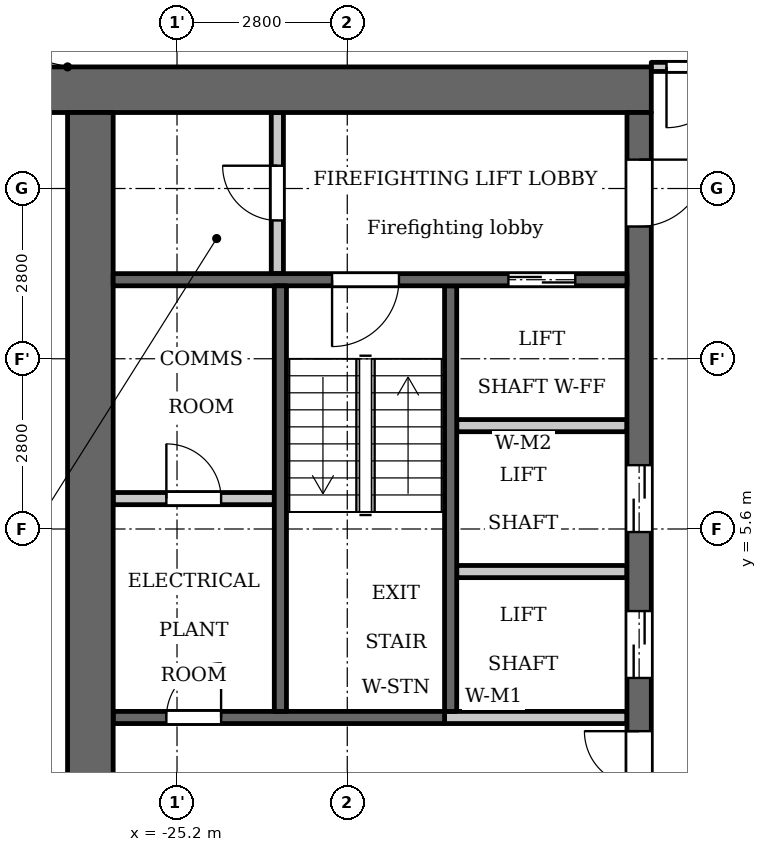
"""IFC4 building model, lengths in metres.
Left out: names, types, materials, properties, quantities, classifications, styles, units other than length and angle.
Written with IfcOpenShell. Run it as: python <this file> out.ifc"""

import sys

from ifc_helpers import new_model, si_unit, direction, frame, frame_2d, origin, place, context, subcontext, project, spatial, rectangle, extrude, element, fill, save


model = new_model("IFC4")
c1 = context("Model", 3, precision=1e-05, world=origin(), true_north=direction((0.0, 1.0)))
c2 = subcontext(c1, "Body", "Model", "MODEL_VIEW")
j1 = project(units=[si_unit("LENGTHUNIT", "METRE"), si_unit("PLANEANGLEUNIT", "RADIAN")], contexts=[c1])
p1 = place(None, origin())
s1 = spatial("IfcSite", under=j1, at=p1, CompositionType="ELEMENT")
p2 = place(p1, origin())
s2 = spatial("IfcBuilding", under=s1, at=p2, CompositionType="ELEMENT")
p3 = place(p2, frame((0.0, 0.0, 164.1)))
s3 = spatial("IfcBuildingStorey", under=s2, at=p3, CompositionType="ELEMENT", Elevation=164.1)
p4 = place(p3, frame((-20.7, 2.6, 0.0), z_axis=(0.0, 0.0, 1.0), x_axis=(0.0, 1.0, 0.0)))
e1 = element("IfcWall", 1, at=p4, inside=s3, PredefinedType="SHEAR", context=c2, shape_type="SweptSolid", body=[
    extrude(rectangle(XDim=7.0, YDim=0.2, at=frame_2d((3.5, 0.0))), origin(), (0.0, 0.0, 1.0), 3.2),
])
p5 = place(p3, frame((-20.8, 2.5, 0.0), z_axis=(0.0, 0.0, 1.0), x_axis=(-1.0, 0.0, 0.0)))
e2 = element("IfcWall", 2, at=p5, inside=s3, PredefinedType="SHEAR", context=c2, shape_type="SweptSolid", body=[
    extrude(rectangle(XDim=5.45, YDim=0.2, at=frame_2d((2.725, 0.0))), origin(), (0.0, 0.0, 1.0), 3.2),
])
p6 = place(p5, frame((3.675, 0.0, 0.0)))
e3 = element("IfcOpeningElement", 3, at=p6, cuts=e2, PredefinedType="OPENING", context=c2, shape_type="SweptSolid", body=[
    extrude(rectangle(XDim=0.9, YDim=2.1, at=frame_2d((0.45, 1.05))), frame((0.0, 0.11, 0.0), z_axis=(0.0, -1.0, 0.0), x_axis=(1.0, 0.0, 0.0)), (0.0, 0.0, 1.0), 0.22),
])
p7 = place(p3, frame((-17.4, 12.825, 0.0), z_axis=(0.0, 0.0, 1.0), x_axis=(-1.0, 0.0, 0.0)))
e4 = element("IfcWall", 4, at=p7, inside=s3, PredefinedType="SHEAR", context=c2, shape_type="SweptSolid", body=[
    extrude(rectangle(XDim=10.4, YDim=0.75, at=frame_2d((5.2, 0.0))), origin(), (0.0, 0.0, 1.0), 3.2),
])
p8 = place(p3, frame((-17.6, -12.45, 0.0), z_axis=(0.0, 0.0, 1.0), x_axis=(0.0, 1.0, 0.0)))
e5 = element("IfcWall", 5, at=p8, inside=s3, PredefinedType="SHEAR", context=c2, shape_type="SweptSolid", body=[
    extrude(rectangle(XDim=24.9, YDim=0.4, at=frame_2d((12.45, 0.0))), origin(), (0.0, 0.0, 1.0), 3.2),
])
p9 = place(p8, frame((8.65, 0.0, 0.0)))
e6 = element("IfcOpeningElement", 6, at=p9, cuts=e5, PredefinedType="OPENING", context=c2, shape_type="SweptSolid", body=[
    extrude(rectangle(XDim=0.9, YDim=2.1, at=frame_2d((0.45, 1.05))), frame((0.0, 0.21, 0.0), z_axis=(0.0, -1.0, 0.0), x_axis=(1.0, 0.0, 0.0)), (0.0, 0.0, 1.0), 0.42),
])
p10 = place(p8, frame((15.6, 0.0, 0.0)))
e7 = element("IfcOpeningElement", 7, at=p10, cuts=e5, PredefinedType="OPENING", context=c2, shape_type="SweptSolid", body=[
    extrude(rectangle(XDim=1.1, YDim=2.1, at=frame_2d((0.55, 1.05))), frame((0.0, 0.21, 0.0), z_axis=(0.0, -1.0, 0.0), x_axis=(1.0, 0.0, 0.0)), (0.0, 0.0, 1.0), 0.42),
])
p11 = place(p8, frame((18.0, 0.0, 0.0)))
e8 = element("IfcOpeningElement", 8, at=p11, cuts=e5, PredefinedType="OPENING", context=c2, shape_type="SweptSolid", body=[
    extrude(rectangle(XDim=1.1, YDim=2.1, at=frame_2d((0.55, 1.05))), frame((0.0, 0.21, 0.0), z_axis=(0.0, -1.0, 0.0), x_axis=(1.0, 0.0, 0.0)), (0.0, 0.0, 1.0), 0.42),
])
p12 = place(p8, frame((23.025, 0.0, 0.0)))
e9 = element("IfcOpeningElement", 9, at=p12, cuts=e5, PredefinedType="OPENING", context=c2, shape_type="SweptSolid", body=[
    extrude(rectangle(XDim=1.1, YDim=2.1, at=frame_2d((0.55, 1.05))), frame((0.0, 0.21, 0.0), z_axis=(0.0, -1.0, 0.0), x_axis=(1.0, 0.0, 0.0)), (0.0, 0.0, 1.0), 0.42),
])
p13 = place(p8, frame((0.775, 0.0, 0.0)))
e10 = element("IfcOpeningElement", 10, at=p13, cuts=e5, PredefinedType="OPENING", context=c2, shape_type="SweptSolid", body=[
    extrude(rectangle(XDim=1.1, YDim=2.1, at=frame_2d((0.55, 1.05))), frame((0.0, 0.21, 0.0), z_axis=(0.0, -1.0, 0.0), x_axis=(1.0, 0.0, 0.0)), (0.0, 0.0, 1.0), 0.42),
])
p14 = place(p8, frame((12.925, 0.0, 0.0)))
e11 = element("IfcOpeningElement", 11, at=p14, cuts=e5, PredefinedType="OPENING", context=c2, shape_type="SweptSolid", body=[
    extrude(rectangle(XDim=1.8, YDim=2.1, at=frame_2d((0.9, 1.05))), frame((0.0, 0.21, 0.0), z_axis=(0.0, -1.0, 0.0), x_axis=(1.0, 0.0, 0.0)), (0.0, 0.0, 1.0), 0.42),
])
p15 = place(p3, frame((-26.625, -12.45, 0.0), z_axis=(0.0, 0.0, 1.0), x_axis=(0.0, 1.0, 0.0)))
e12 = element("IfcWall", 12, at=p15, inside=s3, PredefinedType="SHEAR", context=c2, shape_type="SweptSolid", body=[
    extrude(rectangle(XDim=24.9, YDim=0.75, at=frame_2d((12.45, 0.0))), origin(), (0.0, 0.0, 1.0), 3.2),
])
p16 = place(p3, frame((-23.55, 9.8, 0.0), z_axis=(0.0, 0.0, 1.0), x_axis=(0.0, 1.0, 0.0)))
e13 = element("IfcWall", 13, at=p16, inside=s3, PredefinedType="PARTITIONING", context=c2, shape_type="SweptSolid", body=[
    extrude(rectangle(XDim=2.65, YDim=0.2, at=frame_2d((1.325, 0.0))), origin(), (0.0, 0.0, 1.0), 3.2),
])
p17 = place(p16, frame((0.875, 0.0, 0.0)))
e14 = element("IfcOpeningElement", 14, at=p17, cuts=e13, PredefinedType="OPENING", context=c2, shape_type="SweptSolid", body=[
    extrude(rectangle(XDim=0.9, YDim=2.1, at=frame_2d((0.45, 1.05))), frame((0.0, 0.11, 0.0), z_axis=(0.0, -1.0, 0.0), x_axis=(1.0, 0.0, 0.0)), (0.0, 0.0, 1.0), 0.22),
])
p18 = place(p3, frame((-23.6, 6.1, 0.0), z_axis=(0.0, 0.0, 1.0), x_axis=(-1.0, 0.0, 0.0)))
e15 = element("IfcWall", 15, at=p18, inside=s3, PredefinedType="PARTITIONING", context=c2, shape_type="SweptSolid", body=[
    extrude(rectangle(XDim=2.65, YDim=0.2, at=frame_2d((1.325, 0.0))), origin(), (0.0, 0.0, 1.0), 3.2),
])
p19 = place(p18, frame((0.875, 0.0, 0.0)))
e16 = element("IfcOpeningElement", 16, at=p19, cuts=e15, PredefinedType="OPENING", context=c2, shape_type="SweptSolid", body=[
    extrude(rectangle(XDim=0.9, YDim=2.1, at=frame_2d((0.45, 1.05))), frame((0.0, 0.11, 0.0), z_axis=(0.0, -1.0, 0.0), x_axis=(1.0, 0.0, 0.0)), (0.0, 0.0, 1.0), 0.22),
])
p20 = place(p3, frame((-17.8, 2.5, 0.0), z_axis=(0.0, 0.0, 1.0), x_axis=(-1.0, 0.0, 0.0)))
e17 = element("IfcWall", 17, at=p20, inside=s3, PredefinedType="PARTITIONING", context=c2, shape_type="SweptSolid", body=[
    extrude(rectangle(XDim=3.0, YDim=0.2, at=frame_2d((1.5, 0.0))), origin(), (0.0, 0.0, 1.0), 3.2),
])
for number, where, z_axis, x_axis in (
    (18, (-17.8, 4.9, 0.0), (0.0, 0.0, 1.0), (-1.0, 0.0, 0.0)),
    (19, (-17.8, 7.3, 0.0), (0.0, 0.0, 1.0), (-1.0, 0.0, 0.0)),
):
    element("IfcWall", number, at=place(p3, frame(where, z_axis=z_axis, x_axis=x_axis)), inside=s3, PredefinedType="PARTITIONING", context=c2, shape_type="SweptSolid", body=[
        extrude(rectangle(XDim=2.8, YDim=0.2, at=frame_2d((1.4, 0.0))), origin(), (0.0, 0.0, 1.0), 3.2),
    ])
p21 = place(p3, frame((-17.8, 9.7, 0.0), z_axis=(0.0, 0.0, 1.0), x_axis=(-1.0, 0.0, 0.0)))
e20 = element("IfcWall", 20, at=p21, inside=s3, PredefinedType="SHEAR", context=c2, shape_type="SweptSolid", body=[
    extrude(rectangle(XDim=8.45, YDim=0.2, at=frame_2d((4.225, 0.0))), origin(), (0.0, 0.0, 1.0), 3.2),
])
p22 = place(p21, frame((0.85, 0.0, 0.0)))
e21 = element("IfcOpeningElement", 21, at=p22, cuts=e20, PredefinedType="OPENING", context=c2, shape_type="SweptSolid", body=[
    extrude(rectangle(XDim=1.1, YDim=2.1, at=frame_2d((0.55, 1.05))), frame((0.0, 0.11, 0.0), z_axis=(0.0, -1.0, 0.0), x_axis=(1.0, 0.0, 0.0)), (0.0, 0.0, 1.0), 0.22),
])
p23 = place(p21, frame((3.75, 0.0, 0.0)))
e22 = element("IfcOpeningElement", 22, at=p23, cuts=e20, PredefinedType="OPENING", context=c2, shape_type="SweptSolid", body=[
    extrude(rectangle(XDim=1.1, YDim=2.1, at=frame_2d((0.55, 1.05))), frame((0.0, 0.11, 0.0), z_axis=(0.0, -1.0, 0.0), x_axis=(1.0, 0.0, 0.0)), (0.0, 0.0, 1.0), 0.22),
])
p24 = place(p3, frame((-23.5, 2.6, 0.0), z_axis=(0.0, 0.0, 1.0), x_axis=(0.0, 1.0, 0.0)))
e23 = element("IfcWall", 23, at=p24, inside=s3, PredefinedType="SHEAR", context=c2, shape_type="SweptSolid", body=[
    extrude(rectangle(XDim=7.0, YDim=0.2, at=frame_2d((3.5, 0.0))), origin(), (0.0, 0.0, 1.0), 3.2),
])
p25 = place(p3, frame((-17.4, 13.2, 0.0), z_axis=(0.0, 0.0, 1.0), x_axis=(1.0, 0.0, 0.0)))
e24 = element("IfcWall", 24, at=p25, inside=s3, PredefinedType="PARTITIONING", context=c2, shape_type="SweptSolid", body=[
    extrude(rectangle(XDim=34.8, YDim=0.15, at=frame_2d((17.4, 0.0))), origin(), (0.0, 0.0, 1.0), 3.2),
])
p26 = place(p25, frame((0.25, 0.0, 0.0)))
e25 = element("IfcOpeningElement", 25, at=p26, cuts=e24, PredefinedType="OPENING", context=c2, shape_type="SweptSolid", body=[
    extrude(rectangle(XDim=1.0, YDim=2.1, at=frame_2d((0.5, 1.05))), frame((0.0, 0.085, 0.0), z_axis=(0.0, -1.0, 0.0), x_axis=(1.0, 0.0, 0.0)), (0.0, 0.0, 1.0), 0.17),
])
p27 = place(p25, frame((33.65, 0.0, 0.0)))
e26 = element("IfcOpeningElement", 26, at=p27, cuts=e24, PredefinedType="OPENING", context=c2, shape_type="SweptSolid", body=[
    extrude(rectangle(XDim=1.0, YDim=2.1, at=frame_2d((0.5, 1.05))), frame((0.0, 0.085, 0.0), z_axis=(0.0, -1.0, 0.0), x_axis=(1.0, 0.0, 0.0)), (0.0, 0.0, 1.0), 0.17),
])
p28 = place(p25, frame((15.75, 0.0, 0.0)))
e27 = element("IfcOpeningElement", 27, at=p28, cuts=e24, PredefinedType="OPENING", context=c2, shape_type="SweptSolid", body=[
    extrude(rectangle(XDim=1.0, YDim=2.1, at=frame_2d((0.5, 1.05))), frame((0.0, 0.085, 0.0), z_axis=(0.0, -1.0, 0.0), x_axis=(1.0, 0.0, 0.0)), (0.0, 0.0, 1.0), 0.17),
])
p29 = place(p25, frame((20.85, 0.0, 0.0)))
e28 = element("IfcOpeningElement", 28, at=p29, cuts=e24, PredefinedType="OPENING", context=c2, shape_type="SweptSolid", body=[
    extrude(rectangle(XDim=1.0, YDim=2.1, at=frame_2d((0.5, 1.05))), frame((0.0, 0.085, 0.0), z_axis=(0.0, -1.0, 0.0), x_axis=(1.0, 0.0, 0.0)), (0.0, 0.0, 1.0), 0.17),
])
p30 = place(p25, frame((23.55, 0.0, 0.0)))
e29 = element("IfcOpeningElement", 29, at=p30, cuts=e24, PredefinedType="OPENING", context=c2, shape_type="SweptSolid", body=[
    extrude(rectangle(XDim=1.0, YDim=2.1, at=frame_2d((0.5, 1.05))), frame((0.0, 0.085, 0.0), z_axis=(0.0, -1.0, 0.0), x_axis=(1.0, 0.0, 0.0)), (0.0, 0.0, 1.0), 0.17),
])
p31 = place(p10, origin())
e30 = element("IfcDoor", 30, at=p31, inside=s3, OperationType="DOUBLE_DOOR_SLIDING", PredefinedType="DOOR", context=c2, shape_type="SweptSolid", body=[
    extrude(rectangle(XDim=1.1, YDim=2.1, at=frame_2d((0.55, 1.05))), frame((0.0, 0.025, 0.0), z_axis=(0.0, -1.0, 0.0), x_axis=(1.0, 0.0, 0.0)), (0.0, 0.0, 1.0), 0.05),
])
fill(e7, e30)
p32 = place(p11, origin())
e31 = element("IfcDoor", 31, at=p32, inside=s3, OperationType="DOUBLE_DOOR_SLIDING", PredefinedType="DOOR", context=c2, shape_type="SweptSolid", body=[
    extrude(rectangle(XDim=1.1, YDim=2.1, at=frame_2d((0.55, 1.05))), frame((0.0, 0.025, 0.0), z_axis=(0.0, -1.0, 0.0), x_axis=(1.0, 0.0, 0.0)), (0.0, 0.0, 1.0), 0.05),
])
fill(e8, e31)
p33 = place(p22, origin())
e32 = element("IfcDoor", 32, at=p33, inside=s3, OperationType="DOUBLE_DOOR_SLIDING", PredefinedType="DOOR", context=c2, shape_type="SweptSolid", body=[
    extrude(rectangle(XDim=1.1, YDim=2.1, at=frame_2d((0.55, 1.05))), frame((0.0, 0.025, 0.0), z_axis=(0.0, -1.0, 0.0), x_axis=(1.0, 0.0, 0.0)), (0.0, 0.0, 1.0), 0.05),
])
fill(e21, e32)
p34 = place(p12, origin())
e33 = element("IfcDoor", 33, at=p34, inside=s3, OperationType="SINGLE_SWING_RIGHT", PredefinedType="DOOR", context=c2, shape_type="SweptSolid", body=[
    extrude(rectangle(XDim=1.1, YDim=2.1, at=frame_2d((0.55, 1.05))), frame((0.0, 0.025, 0.0), z_axis=(0.0, -1.0, 0.0), x_axis=(1.0, 0.0, 0.0)), (0.0, 0.0, 1.0), 0.05),
])
fill(e9, e33)
p35 = place(p17, origin())
e34 = element("IfcDoor", 34, at=p35, inside=s3, OperationType="SINGLE_SWING_LEFT", PredefinedType="DOOR", context=c2, shape_type="SweptSolid", body=[
    extrude(rectangle(XDim=0.9, YDim=2.1, at=frame_2d((0.45, 1.05))), frame((0.0, 0.025, 0.0), z_axis=(0.0, -1.0, 0.0), x_axis=(1.0, 0.0, 0.0)), (0.0, 0.0, 1.0), 0.05),
])
fill(e14, e34)
p36 = place(p23, origin())
e35 = element("IfcDoor", 35, at=p36, inside=s3, OperationType="SINGLE_SWING_LEFT", PredefinedType="DOOR", context=c2, shape_type="SweptSolid", body=[
    extrude(rectangle(XDim=1.1, YDim=2.1, at=frame_2d((0.55, 1.05))), frame((0.0, 0.025, 0.0), z_axis=(0.0, -1.0, 0.0), x_axis=(1.0, 0.0, 0.0)), (0.0, 0.0, 1.0), 0.05),
])
fill(e22, e35)
p37 = place(p14, origin())
e36 = element("IfcDoor", 36, at=p37, inside=s3, OperationType="DOUBLE_DOOR_SINGLE_SWING", PredefinedType="DOOR", context=c2, shape_type="SweptSolid", body=[
    extrude(rectangle(XDim=1.8, YDim=2.1, at=frame_2d((0.9, 1.05))), frame((0.0, 0.025, 0.0), z_axis=(0.0, -1.0, 0.0), x_axis=(1.0, 0.0, 0.0)), (0.0, 0.0, 1.0), 0.05),
])
fill(e11, e36)
p38 = place(p19, origin())
e37 = element("IfcDoor", 37, at=p38, inside=s3, OperationType="SINGLE_SWING_RIGHT", PredefinedType="DOOR", context=c2, shape_type="SweptSolid", body=[
    extrude(rectangle(XDim=0.9, YDim=2.1, at=frame_2d((0.45, 1.05))), frame((0.0, 0.025, 0.0), z_axis=(0.0, -1.0, 0.0), x_axis=(1.0, 0.0, 0.0)), (0.0, 0.0, 1.0), 0.05),
])
fill(e16, e37)
p39 = place(p6, origin())
e38 = element("IfcDoor", 38, at=p39, inside=s3, OperationType="SINGLE_SWING_LEFT", PredefinedType="DOOR", context=c2, shape_type="SweptSolid", body=[
    extrude(rectangle(XDim=0.9, YDim=2.1, at=frame_2d((0.45, 1.05))), frame((0.0, 0.025, 0.0), z_axis=(0.0, -1.0, 0.0), x_axis=(1.0, 0.0, 0.0)), (0.0, 0.0, 1.0), 0.05),
])
fill(e3, e38)
p40 = place(p26, origin())
e39 = element("IfcDoor", 39, at=p40, inside=s3, OperationType="SINGLE_SWING_LEFT", PredefinedType="DOOR", context=c2, shape_type="SweptSolid", body=[
    extrude(rectangle(XDim=1.0, YDim=2.1, at=frame_2d((0.5, 1.05))), frame((0.0, 0.025, 0.0), z_axis=(0.0, -1.0, 0.0), x_axis=(1.0, 0.0, 0.0)), (0.0, 0.0, 1.0), 0.05),
])
fill(e25, e39)
save(model, sys.argv[1])
